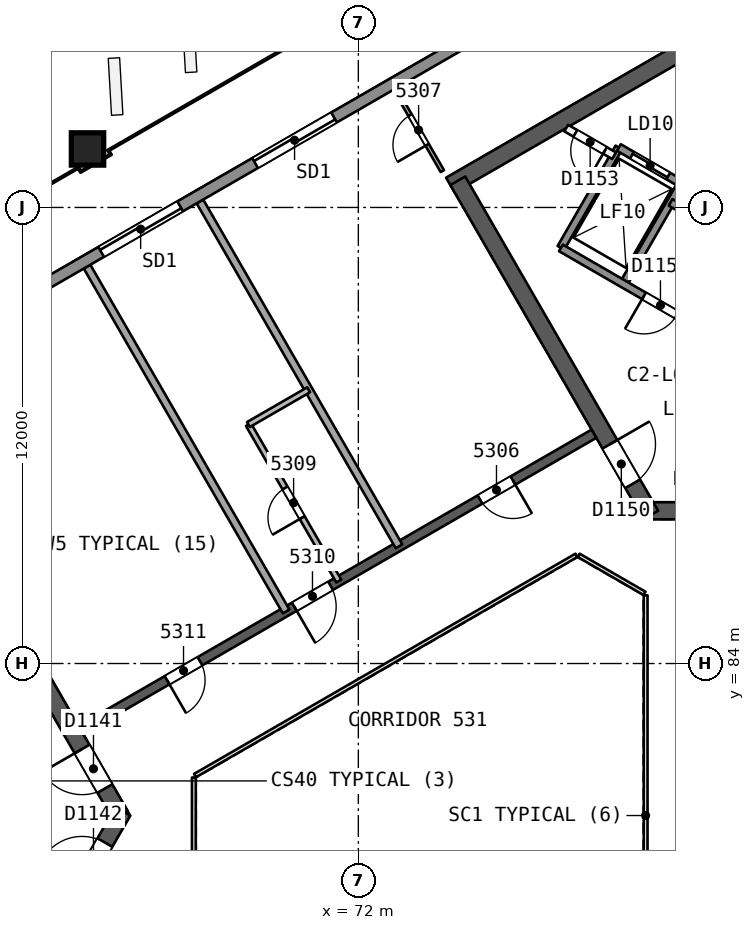
"""IFC4 building model, lengths in metres.
Left out: names, types, materials, properties, quantities, classifications, styles, units other than length and angle.
Written with IfcOpenShell. Run it as: python <this file> out.ifc"""

import sys

from ifc_helpers import new_model, si_unit, direction, frame, frame_2d, origin, origin_2d, place, context, subcontext, project, spatial, rectangle, extrude, element, fill, save


model = new_model("IFC4")
c1 = context("Model", 3, precision=1e-05, world=origin(), true_north=direction((0.0, 1.0)))
c2 = subcontext(c1, "Body", "Model", "MODEL_VIEW")
j1 = project(units=[si_unit("LENGTHUNIT", "METRE"), si_unit("PLANEANGLEUNIT", "RADIAN")], contexts=[c1])
p1 = place(None, origin())
s1 = spatial("IfcSite", under=j1, at=p1, CompositionType="ELEMENT")
p2 = place(p1, origin())
s2 = spatial("IfcBuilding", under=s1, at=p2, CompositionType="ELEMENT")
p3 = place(p2, frame((0.0, 0.0, 216.9)))
s3 = spatial("IfcBuildingStorey", under=s2, at=p3, CompositionType="ELEMENT", Elevation=216.9)
p4 = place(p3, frame((65.74, 80.0, 0.0), z_axis=(0.0, 0.0, 1.0), x_axis=(-0.499991857942, 0.866030104553, 0.0)))
e1 = element("IfcWall", 1, at=p4, inside=s3, PredefinedType="SHEAR", context=c2, shape_type="SweptSolid", body=[
    extrude(rectangle(XDim=10.25, YDim=0.45, at=frame_2d((5.125, 0.0))), origin(), (0.0, 0.0, 1.0), 3.7),
])
p5 = place(p4, frame((0.82, 0.0, 0.0)))
e2 = element("IfcOpeningElement", 2, at=p5, cuts=e1, PredefinedType="OPENING", context=c2, shape_type="SweptSolid", body=[
    extrude(rectangle(XDim=1.2, YDim=2.1, at=frame_2d((0.6, 1.05))), frame((0.0, 0.235, 0.0), z_axis=(0.0, -1.0, 0.0), x_axis=(1.0, 0.0, 0.0)), (0.0, 0.0, 1.0), 0.471),
])
p6 = place(p3, frame((60.728, 71.318, 0.0), z_axis=(0.0, 0.0, 1.0), x_axis=(0.500012416173, 0.866018235185, 0.0)))
e3 = element("IfcWall", 3, at=p6, inside=s3, PredefinedType="SHEAR", context=c2, shape_type="SweptSolid", body=[
    extrude(rectangle(XDim=10.155, YDim=0.45, at=frame_2d((5.078, 0.0))), origin(), (0.0, 0.0, 1.0), 3.7),
])
p7 = place(p6, frame((8.005, 0.0, 0.0)))
e4 = element("IfcOpeningElement", 4, at=p7, cuts=e3, PredefinedType="OPENING", context=c2, shape_type="SweptSolid", body=[
    extrude(rectangle(XDim=1.2, YDim=2.1, at=frame_2d((0.6, 1.05))), frame((0.0, 0.235, 0.0), z_axis=(0.0, -1.0, 0.0), x_axis=(1.0, 0.0, 0.0)), (0.0, 0.0, 1.0), 0.471),
])
p8 = place(p3, frame((79.63, 88.019, 0.0), z_axis=(0.0, 0.0, 1.0), x_axis=(1.0, 0.0, 0.0)))
e5 = element("IfcWall", 5, at=p8, inside=s3, PredefinedType="SHEAR", context=c2, shape_type="SweptSolid", body=[
    extrude(rectangle(XDim=10.25, YDim=0.45, at=frame_2d((5.125, 0.0))), origin(), (0.0, 0.0, 1.0), 3.7),
])
p9 = place(p8, frame((0.82, 0.0, 0.0)))
e6 = element("IfcOpeningElement", 6, at=p9, cuts=e5, PredefinedType="OPENING", context=c2, shape_type="SweptSolid", body=[
    extrude(rectangle(XDim=1.2, YDim=2.1, at=frame_2d((0.6, 1.05))), frame((0.0, 0.235, 0.0), z_axis=(0.0, -1.0, 0.0), x_axis=(1.0, 0.0, 0.0)), (0.0, 0.0, 1.0), 0.471),
])
p10 = place(p3, frame((86.723, 103.69, 0.0), z_axis=(0.0, 0.0, 1.0), x_axis=(-0.866022713978, -0.500004658852, 0.0)))
e7 = element("IfcWall", 7, at=p10, inside=s3, PredefinedType="SHEAR", context=c2, shape_type="SweptSolid", body=[
    extrude(rectangle(XDim=14.203, YDim=0.45, at=frame_2d((7.102, 0.0))), origin(), (0.0, 0.0, 1.0), 3.7),
])
p11 = place(p3, frame((74.617, 96.701, 0.0), z_axis=(0.0, 0.0, 1.0), x_axis=(0.499994385119, -0.866028645513, 0.0)))
e8 = element("IfcWall", 8, at=p11, inside=s3, PredefinedType="SHEAR", context=c2, shape_type="SweptSolid", body=[
    extrude(rectangle(XDim=10.155, YDim=0.45, at=frame_2d((5.077, 0.0))), origin(), (0.0, 0.0, 1.0), 3.7),
])
p12 = place(p11, frame((8.005, 0.0, 0.0)))
e9 = element("IfcOpeningElement", 9, at=p12, cuts=e8, PredefinedType="OPENING", context=c2, shape_type="SweptSolid", body=[
    extrude(rectangle(XDim=1.2, YDim=2.1, at=frame_2d((0.6, 1.05))), frame((0.0, 0.235, 0.0), z_axis=(0.0, -1.0, 0.0), x_axis=(1.0, 0.0, 0.0)), (0.0, 0.0, 1.0), 0.471),
])
p13 = place(p3, frame((78.2, 90.046, 0.0), z_axis=(0.0, 0.0, 1.0), x_axis=(-0.866026492143, -0.499998114903, 0.0)))
e10 = element("IfcWall", 10, at=p13, inside=s3, PredefinedType="SHEAR", context=c2, shape_type="SweptSolid", body=[
    extrude(rectangle(XDim=15.588, YDim=0.25, at=frame_2d((7.794, 0.0))), origin(), (0.0, 0.0, 1.0), 3.3),
])
p14 = place(p13, frame((2.462, 0.0, 0.0)))
e11 = element("IfcOpeningElement", 11, at=p14, cuts=e10, PredefinedType="OPENING", context=c2, shape_type="SweptSolid", body=[
    extrude(rectangle(XDim=1.0, YDim=2.1, at=frame_2d((0.5, 1.05))), frame((0.0, 0.135, 0.0), z_axis=(0.0, -1.0, 0.0), x_axis=(1.0, 0.0, 0.0)), (0.0, 0.0, 1.0), 0.271),
])
p15 = place(p13, frame((8.003, 0.0, 0.0)))
e12 = element("IfcOpeningElement", 12, at=p15, cuts=e10, PredefinedType="OPENING", context=c2, shape_type="SweptSolid", body=[
    extrude(rectangle(XDim=1.1, YDim=2.1, at=frame_2d((0.55, 1.05))), frame((0.0, 0.135, 0.0), z_axis=(0.0, -1.0, 0.0), x_axis=(1.0, 0.0, 0.0)), (0.0, 0.0, 1.0), 0.271),
])
p16 = place(p13, frame((11.971, 0.0, 0.0)))
e13 = element("IfcOpeningElement", 13, at=p16, cuts=e10, PredefinedType="OPENING", context=c2, shape_type="SweptSolid", body=[
    extrude(rectangle(XDim=1.0, YDim=2.1, at=frame_2d((0.5, 1.05))), frame((0.0, 0.135, 0.0), z_axis=(0.0, -1.0, 0.0), x_axis=(1.0, 0.0, 0.0)), (0.0, 0.0, 1.0), 0.271),
])
p17 = place(p3, frame((64.862, 97.56, 0.0), z_axis=(0.010092954999, -0.017481261926, 0.999796248113), x_axis=(-0.499897099477, 0.865849541015, 0.020185694417)))
e14 = element("IfcColumn", 14, at=p17, inside=s3, PredefinedType="COLUMN", context=c2, shape_type="SweptSolid", body=[
    extrude(rectangle(XDim=0.85, YDim=0.85, at=origin_2d()), origin(), (0.0, 0.0, 1.0), 3.701),
])
p18 = place(p3, frame((74.21, 96.956, 0.0), z_axis=(0.0, 0.0, 1.0), x_axis=(-0.499953629774, 0.866052173992, 0.0)))
e15 = element("IfcWall", 15, at=p18, inside=s3, PredefinedType="PARTITIONING", context=c2, shape_type="SweptSolid", body=[
    extrude(rectangle(XDim=2.499, YDim=0.1, at=frame_2d((1.25, 0.0))), origin(), (0.0, 0.0, 1.0), 3.3),
])
p19 = place(p18, frame((0.799, 0.0, 0.0)))
e16 = element("IfcOpeningElement", 16, at=p19, cuts=e15, PredefinedType="OPENING", context=c2, shape_type="SweptSolid", body=[
    extrude(rectangle(XDim=0.9, YDim=2.1, at=frame_2d((0.45, 1.05))), frame((0.0, 0.061, 0.0), z_axis=(0.0, -1.0, 0.0), x_axis=(1.0, 0.0, 0.0)), (0.0, 0.0, 1.0), 0.121),
])
p20 = place(p3, frame((67.831, 96.158, 0.0), z_axis=(0.0, 0.0, 1.0), x_axis=(0.500010879287, -0.866019122534, 0.0)))
e17 = element("IfcWall", 17, at=p20, inside=s3, PredefinedType="PARTITIONING", context=c2, shape_type="SweptSolid", body=[
    extrude(rectangle(XDim=10.478, YDim=0.2, at=frame_2d((5.239, 0.0))), origin(), (0.0, 0.0, 1.0), 3.3),
])
p21 = place(p3, frame((71.486, 86.169, 0.0), z_axis=(0.0, 0.0, 1.0), x_axis=(-0.499987613552, 0.866032554986, 0.0)))
e18 = element("IfcWall", 18, at=p21, inside=s3, PredefinedType="PARTITIONING", context=c2, shape_type="SweptSolid", body=[
    extrude(rectangle(XDim=4.755, YDim=0.15, at=frame_2d((2.378, 0.0))), origin(), (0.0, 0.0, 1.0), 3.3),
])
p22 = place(p21, frame((1.928, 0.0, 0.0)))
e19 = element("IfcOpeningElement", 19, at=p22, cuts=e18, PredefinedType="OPENING", context=c2, shape_type="SweptSolid", body=[
    extrude(rectangle(XDim=0.9, YDim=2.1, at=frame_2d((0.45, 1.05))), frame((0.0, 0.085, 0.0), z_axis=(0.0, -1.0, 0.0), x_axis=(1.0, 0.0, 0.0)), (0.0, 0.0, 1.0), 0.171),
])
p23 = place(p3, frame((69.108, 90.288, 0.0), z_axis=(0.0, 0.0, 1.0), x_axis=(0.866050016054, 0.499957367875, 0.0)))
e20 = element("IfcWall", 20, at=p23, inside=s3, PredefinedType="PARTITIONING", context=c2, shape_type="SweptSolid", body=[
    extrude(rectangle(XDim=1.829, YDim=0.15, at=frame_2d((0.915, 0.0))), origin(), (0.0, 0.0, 1.0), 3.3),
])
p24 = place(p3, frame((64.861, 94.443, 0.0), z_axis=(0.0, 0.0, 1.0), x_axis=(0.500010879287, -0.866019122534, 0.0)))
e21 = element("IfcWall", 21, at=p24, inside=s3, PredefinedType="PARTITIONING", context=c2, shape_type="SweptSolid", body=[
    extrude(rectangle(XDim=10.478, YDim=0.2, at=frame_2d((5.239, 0.0))), origin(), (0.0, 0.0, 1.0), 3.3),
])
p25 = place(p3, frame((44.063, 82.607, 0.0), z_axis=(0.0, 0.0, 1.0), x_axis=(0.866024402399, 0.500001734447, 0.0)))
e22 = element("IfcWall", 22, at=p25, inside=s3, PredefinedType="SOLIDWALL", context=c2, shape_type="SweptSolid", body=[
    extrude(rectangle(XDim=50.977, YDim=0.3, at=frame_2d((25.488, 0.0))), origin(), (0.0, 0.0, 1.0), 3.3),
])
p26 = place(p25, frame((24.444, 0.0, 0.0)))
e23 = element("IfcOpeningElement", 23, at=p26, cuts=e22, PredefinedType="OPENING", context=c2, shape_type="SweptSolid", body=[
    extrude(rectangle(XDim=2.4, YDim=2.4, at=frame_2d((1.2, 1.2))), frame((0.0, 0.161, 0.0), z_axis=(0.0, -1.0, 0.0), x_axis=(1.0, 0.0, 0.0)), (0.0, 0.0, 1.0), 0.321),
])
p27 = place(p25, frame((29.121, 0.0, 0.0)))
e24 = element("IfcOpeningElement", 24, at=p27, cuts=e22, PredefinedType="OPENING", context=c2, shape_type="SweptSolid", body=[
    extrude(rectangle(XDim=2.4, YDim=2.4, at=frame_2d((1.2, 1.2))), frame((0.0, 0.161, 0.0), z_axis=(0.0, -1.0, 0.0), x_axis=(1.0, 0.0, 0.0)), (0.0, 0.0, 1.0), 0.321),
])
p28 = place(p25, frame((39.656, 0.0, 0.0)))
e25 = element("IfcOpeningElement", 25, at=p28, cuts=e22, PredefinedType="OPENING", context=c2, shape_type="SweptSolid", body=[
    extrude(rectangle(XDim=2.4, YDim=2.4, at=frame_2d((1.2, 1.2))), frame((0.0, 0.161, 0.0), z_axis=(0.0, -1.0, 0.0), x_axis=(1.0, 0.0, 0.0)), (0.0, 0.0, 1.0), 0.321),
])
p29 = place(p25, frame((19.612, 0.0, 0.0)))
e26 = element("IfcOpeningElement", 26, at=p29, cuts=e22, PredefinedType="OPENING", context=c2, shape_type="SweptSolid", body=[
    extrude(rectangle(XDim=2.4, YDim=2.4, at=frame_2d((1.2, 1.2))), frame((0.0, 0.161, 0.0), z_axis=(0.0, -1.0, 0.0), x_axis=(1.0, 0.0, 0.0)), (0.0, 0.0, 1.0), 0.321),
])
p30 = place(p25, frame((8.885, 0.0, 0.0)))
e27 = element("IfcOpeningElement", 27, at=p30, cuts=e22, PredefinedType="OPENING", context=c2, shape_type="SweptSolid", body=[
    extrude(rectangle(XDim=2.4, YDim=2.4, at=frame_2d((1.2, 1.2))), frame((0.0, 0.161, 0.0), z_axis=(0.0, -1.0, 0.0), x_axis=(1.0, 0.0, 0.0)), (0.0, 0.0, 1.0), 0.321),
])
for number, where, z_axis, x_axis in (
    (28, (78.976, 93.986, 0.0), (0.0, 0.0, 1.0), (0.5, 0.866, 0.0)),
    (29, (77.33, 94.936, 0.0), (0.0, 0.0, 1.0), (0.5, 0.866, 0.0)),
):
    element("IfcWall", number, at=place(p3, frame(where, z_axis=z_axis, x_axis=x_axis)), inside=s3, PredefinedType="SOLIDWALL", context=c2, shape_type="SweptSolid", body=[
        extrude(rectangle(XDim=3.05, YDim=0.2, at=frame_2d((1.525, 0.0))), origin(), (0.0, 0.0, 1.0), 3.3),
    ])
p31 = place(p3, frame((86.77, 89.486, 0.0), z_axis=(0.0, 0.0, 1.0), x_axis=(-0.86601811187, 0.500012629753, 0.0)))
e30 = element("IfcWall", 30, at=p31, inside=s3, PredefinedType="SOLIDWALL", context=c2, shape_type="SweptSolid", body=[
    extrude(rectangle(XDim=10.9, YDim=0.2, at=frame_2d((5.45, 0.0))), origin(), (0.0, 0.0, 1.0), 3.3),
])
p32 = place(p31, frame((2.875, 0.0, 0.0)))
e31 = element("IfcOpeningElement", 31, at=p32, cuts=e30, PredefinedType="OPENING", context=c2, shape_type="SweptSolid", body=[
    extrude(rectangle(XDim=1.0, YDim=2.1, at=frame_2d((0.5, 1.05))), frame((0.0, 0.11, 0.0), z_axis=(0.0, -1.0, 0.0), x_axis=(1.0, 0.0, 0.0)), (0.0, 0.0, 1.0), 0.221),
])
p33 = place(p31, frame((7.375, 0.0, 0.0)))
e32 = element("IfcOpeningElement", 32, at=p33, cuts=e30, PredefinedType="OPENING", context=c2, shape_type="SweptSolid", body=[
    extrude(rectangle(XDim=1.0, YDim=2.1, at=frame_2d((0.5, 1.05))), frame((0.0, 0.11, 0.0), z_axis=(0.0, -1.0, 0.0), x_axis=(1.0, 0.0, 0.0)), (0.0, 0.0, 1.0), 0.221),
])
p34 = place(p3, frame((89.43, 90.814, 0.0), z_axis=(0.0, 0.0, 1.0), x_axis=(-0.866018983788, 0.500011119594, 0.0)))
e33 = element("IfcWall", 33, at=p34, inside=s3, PredefinedType="SOLIDWALL", context=c2, shape_type="SweptSolid", body=[
    extrude(rectangle(XDim=10.64, YDim=0.2, at=frame_2d((5.32, 0.0))), origin(), (0.0, 0.0, 1.0), 3.3),
])
p35 = place(p34, frame((0.37, 0.0, 0.0)))
e34 = element("IfcOpeningElement", 34, at=p35, cuts=e33, PredefinedType="OPENING", context=c2, shape_type="SweptSolid", body=[
    extrude(rectangle(XDim=0.9, YDim=2.1, at=frame_2d((0.45, 1.05))), frame((0.0, 0.11, 0.0), z_axis=(0.0, -1.0, 0.0), x_axis=(1.0, 0.0, 0.0)), (0.0, 0.0, 1.0), 0.221),
])
p36 = place(p3, frame((78.73, 97.361, 0.0), z_axis=(0.0, 0.0, 1.0), x_axis=(-0.866045896294, 0.499964504253, 0.0)))
e35 = element("IfcWall", 35, at=p36, inside=s3, PredefinedType="PARTITIONING", context=c2, shape_type="SweptSolid", body=[
    extrude(rectangle(XDim=1.455, YDim=0.2, at=frame_2d((0.728, 0.0))), origin(), (0.0, 0.0, 1.0), 3.3),
])
p37 = place(p36, frame((0.278, 0.0, 0.0)))
e36 = element("IfcOpeningElement", 36, at=p37, cuts=e35, PredefinedType="OPENING", context=c2, shape_type="SweptSolid", body=[
    extrude(rectangle(XDim=0.9, YDim=2.1, at=frame_2d((0.45, 1.05))), frame((0.0, 0.11, 0.0), z_axis=(0.0, -1.0, 0.0), x_axis=(1.0, 0.0, 0.0)), (0.0, 0.0, 1.0), 0.221),
])
p38 = place(p3, frame((80.5, 96.627, 0.0), z_axis=(0.0, 0.0, 1.0), x_axis=(-0.86601224135, 0.500022797313, 0.0)))
e37 = element("IfcWall", 37, at=p38, inside=s3, PredefinedType="SOLIDWALL", context=c2, shape_type="SweptSolid", body=[
    extrude(rectangle(XDim=1.9, YDim=0.2, at=frame_2d((0.95, 0.0))), origin(), (0.0, 0.0, 1.0), 3.3),
])
p39 = place(p38, frame((0.4, 0.0, 0.0)))
e38 = element("IfcOpeningElement", 38, at=p39, cuts=e37, PredefinedType="OPENING", context=c2, shape_type="SweptSolid", body=[
    extrude(rectangle(XDim=1.1, YDim=2.1, at=frame_2d((0.55, 1.05))), frame((0.0, 0.11, 0.0), z_axis=(0.0, -1.0, 0.0), x_axis=(1.0, 0.0, 0.0)), (0.0, 0.0, 1.0), 0.221),
])
p40 = place(p3, frame((79.56, 74.206, 0.0), z_axis=(0.0, 0.0, 1.0), x_axis=(0.0, 1.0, 0.0)))
e39 = element("IfcWall", 39, at=p40, inside=s3, PredefinedType="PARTITIONING", context=c2, shape_type="SweptSolid", body=[
    extrude(rectangle(XDim=11.588, YDim=0.1, at=frame_2d((5.794, 0.0))), origin(), (0.0, 0.0, 1.0), 3.3),
])
p41 = place(p3, frame((79.53, 85.846, 0.0), z_axis=(0.0, 0.0, 1.0), x_axis=(-0.866041268327, 0.499972520799, 0.0)))
e40 = element("IfcWall", 40, at=p41, inside=s3, PredefinedType="PARTITIONING", context=c2, shape_type="SweptSolid", body=[
    extrude(rectangle(XDim=2.0, YDim=0.1, at=frame_2d((1.0, 0.0))), origin(), (0.0, 0.0, 1.0), 3.3),
])
p42 = place(p3, frame((77.738, 86.846, 0.0), z_axis=(0.0, 0.0, 1.0), x_axis=(-0.866026658274, -0.499997827154, 0.0)))
e41 = element("IfcWall", 41, at=p42, inside=s3, PredefinedType="PARTITIONING", context=c2, shape_type="SweptSolid", body=[
    extrude(rectangle(XDim=11.588, YDim=0.1, at=frame_2d((5.794, 0.0))), origin(), (0.0, 0.0, 1.0), 3.3),
])
p43 = place(p3, frame((67.672, 81.0, 0.0), z_axis=(0.0, 0.0, 1.0), x_axis=(0.0, -1.0, 0.0)))
e42 = element("IfcWall", 42, at=p43, inside=s3, PredefinedType="PARTITIONING", context=c2, shape_type="SweptSolid", body=[
    extrude(rectangle(XDim=2.0, YDim=0.1, at=frame_2d((1.0, 0.0))), origin(), (0.0, 0.0, 1.0), 3.3),
])
p44 = place(p14, origin())
e43 = element("IfcDoor", 43, at=p44, inside=s3, OperationType="SINGLE_SWING_LEFT", PredefinedType="NOTDEFINED", context=c2, shape_type="SweptSolid", body=[
    extrude(rectangle(XDim=1.0, YDim=2.1, at=frame_2d((0.5, 1.05))), frame((0.0, 0.025, 0.0), z_axis=(0.0, -1.0, 0.0), x_axis=(1.0, 0.0, 0.0)), (0.0, 0.0, 1.0), 0.05),
])
fill(e11, e43)
p45 = place(p19, origin())
e44 = element("IfcDoor", 44, at=p45, inside=s3, OperationType="SINGLE_SWING_LEFT", PredefinedType="NOTDEFINED", context=c2, shape_type="SweptSolid", body=[
    extrude(rectangle(XDim=0.9, YDim=2.1, at=frame_2d((0.45, 1.05))), frame((0.0, 0.025, 0.0), z_axis=(0.0, -1.0, 0.0), x_axis=(1.0, 0.0, 0.0)), (0.0, 0.0, 1.0), 0.05),
])
fill(e16, e44)
p46 = place(p22, origin())
e45 = element("IfcDoor", 45, at=p46, inside=s3, OperationType="SINGLE_SWING_LEFT", PredefinedType="NOTDEFINED", context=c2, shape_type="SweptSolid", body=[
    extrude(rectangle(XDim=0.9, YDim=2.1, at=frame_2d((0.45, 1.05))), frame((0.0, 0.025, 0.0), z_axis=(0.0, -1.0, 0.0), x_axis=(1.0, 0.0, 0.0)), (0.0, 0.0, 1.0), 0.05),
])
fill(e19, e45)
p47 = place(p15, origin())
e46 = element("IfcDoor", 46, at=p47, inside=s3, OperationType="SINGLE_SWING_RIGHT", PredefinedType="NOTDEFINED", context=c2, shape_type="SweptSolid", body=[
    extrude(rectangle(XDim=1.1, YDim=2.1, at=frame_2d((0.55, 1.05))), frame((0.0, 0.025, 0.0), z_axis=(0.0, -1.0, 0.0), x_axis=(1.0, 0.0, 0.0)), (0.0, 0.0, 1.0), 0.05),
])
fill(e12, e46)
p48 = place(p16, origin())
e47 = element("IfcDoor", 47, at=p48, inside=s3, OperationType="SINGLE_SWING_RIGHT", PredefinedType="NOTDEFINED", context=c2, shape_type="SweptSolid", body=[
    extrude(rectangle(XDim=1.0, YDim=2.1, at=frame_2d((0.5, 1.05))), frame((0.0, 0.025, 0.0), z_axis=(0.0, -1.0, 0.0), x_axis=(1.0, 0.0, 0.0)), (0.0, 0.0, 1.0), 0.05),
])
fill(e13, e47)
p49 = place(p26, origin())
e48 = element("IfcDoor", 48, at=p49, inside=s3, OperationType="SLIDING_TO_LEFT", PredefinedType="NOTDEFINED", context=c2, shape_type="SweptSolid", body=[
    extrude(rectangle(XDim=2.4, YDim=2.4, at=frame_2d((1.2, 1.2))), frame((0.0, 0.025, 0.0), z_axis=(0.0, -1.0, 0.0), x_axis=(1.0, 0.0, 0.0)), (0.0, 0.0, 1.0), 0.05),
])
fill(e23, e48)
p50 = place(p27, origin())
e49 = element("IfcDoor", 49, at=p50, inside=s3, OperationType="SLIDING_TO_RIGHT", PredefinedType="NOTDEFINED", context=c2, shape_type="SweptSolid", body=[
    extrude(rectangle(XDim=2.4, YDim=2.4, at=frame_2d((1.2, 1.2))), frame((0.0, 0.025, 0.0), z_axis=(0.0, -1.0, 0.0), x_axis=(1.0, 0.0, 0.0)), (0.0, 0.0, 1.0), 0.05),
])
fill(e24, e49)
p51 = place(p5, origin())
e50 = element("IfcDoor", 50, at=p51, inside=s3, OperationType="SINGLE_SWING_RIGHT", PredefinedType="NOTDEFINED", context=c2, shape_type="SweptSolid", body=[
    extrude(rectangle(XDim=1.2, YDim=2.1, at=frame_2d((0.6, 1.05))), frame((0.0, 0.025, 0.0), z_axis=(0.0, -1.0, 0.0), x_axis=(1.0, 0.0, 0.0)), (0.0, 0.0, 1.0), 0.05),
])
fill(e2, e50)
p52 = place(p7, origin())
e51 = element("IfcDoor", 51, at=p52, inside=s3, OperationType="SINGLE_SWING_LEFT", PredefinedType="NOTDEFINED", context=c2, shape_type="SweptSolid", body=[
    extrude(rectangle(XDim=1.2, YDim=2.1, at=frame_2d((0.6, 1.05))), frame((0.0, 0.025, 0.0), z_axis=(0.0, -1.0, 0.0), x_axis=(1.0, 0.0, 0.0)), (0.0, 0.0, 1.0), 0.05),
])
fill(e4, e51)
p53 = place(p12, origin())
e52 = element("IfcDoor", 52, at=p53, inside=s3, OperationType="SINGLE_SWING_LEFT", PredefinedType="NOTDEFINED", context=c2, shape_type="SweptSolid", body=[
    extrude(rectangle(XDim=1.2, YDim=2.1, at=frame_2d((0.6, 1.05))), frame((0.0, 0.025, 0.0), z_axis=(0.0, -1.0, 0.0), x_axis=(1.0, 0.0, 0.0)), (0.0, 0.0, 1.0), 0.05),
])
fill(e9, e52)
p54 = place(p39, origin())
e53 = element("IfcDoor", 53, at=p54, inside=s3, OperationType="SLIDING_TO_RIGHT", PredefinedType="NOTDEFINED", context=c2, shape_type="SweptSolid", body=[
    extrude(rectangle(XDim=1.1, YDim=2.1, at=frame_2d((0.55, 1.05))), frame((0.0, 0.025, 0.0), z_axis=(0.0, -1.0, 0.0), x_axis=(1.0, 0.0, 0.0)), (0.0, 0.0, 1.0), 0.05),
])
fill(e38, e53)
p55 = place(p33, origin())
e54 = element("IfcDoor", 54, at=p55, inside=s3, OperationType="SINGLE_SWING_RIGHT", PredefinedType="NOTDEFINED", context=c2, shape_type="SweptSolid", body=[
    extrude(rectangle(XDim=1.0, YDim=2.1, at=frame_2d((0.5, 1.05))), frame((0.0, 0.025, 0.0), z_axis=(0.0, -1.0, 0.0), x_axis=(1.0, 0.0, 0.0)), (0.0, 0.0, 1.0), 0.05),
])
fill(e32, e54)
p56 = place(p37, origin())
e55 = element("IfcDoor", 55, at=p56, inside=s3, OperationType="SINGLE_SWING_LEFT", PredefinedType="NOTDEFINED", context=c2, shape_type="SweptSolid", body=[
    extrude(rectangle(XDim=0.9, YDim=2.1, at=frame_2d((0.45, 1.05))), frame((0.0, 0.025, 0.0), z_axis=(0.0, -1.0, 0.0), x_axis=(1.0, 0.0, 0.0)), (0.0, 0.0, 1.0), 0.05),
])
fill(e36, e55)
save(model, sys.argv[1])
